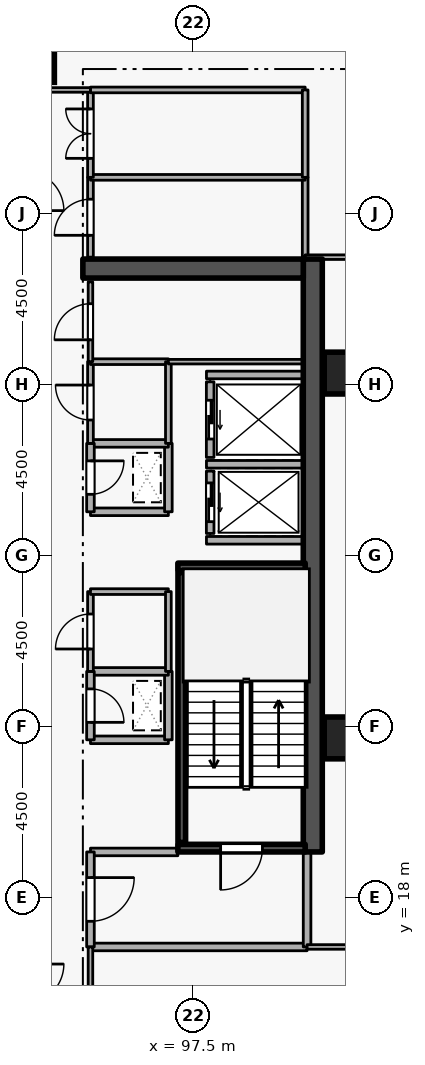
"""IFC4 building model, lengths in metres.
Left out: names, types, materials, properties, quantities, classifications, styles, units other than length and angle.
Written with IfcOpenShell. Run it as: python <this file> out.ifc"""

import sys

from ifc_helpers import new_model, si_unit, direction, frame, frame_2d, origin, origin_2d, place, context, subcontext, project, spatial, rectangle, extrude, element, fill, save


model = new_model("IFC4")
c1 = context("Model", 3, precision=1e-05, world=origin(), true_north=direction((0.0, 1.0)))
c2 = subcontext(c1, "Body", "Model", "MODEL_VIEW")
j1 = project(units=[si_unit("LENGTHUNIT", "METRE"), si_unit("PLANEANGLEUNIT", "RADIAN")], contexts=[c1])
p1 = place(None, origin())
s1 = spatial("IfcSite", under=j1, at=p1, CompositionType="ELEMENT")
p2 = place(p1, origin())
s2 = spatial("IfcBuilding", under=s1, at=p2, CompositionType="ELEMENT")
p3 = place(p2, frame((0.0, 0.0, 185.7)))
s3 = spatial("IfcBuildingStorey", under=s2, at=p3, CompositionType="ELEMENT", Elevation=185.7)
p4 = place(p3, frame((100.65, 19.2, 0.0), z_axis=(0.0, 0.0, 1.0), x_axis=(0.0, 1.0, 0.0)))
e1 = element("IfcWall", 1, at=p4, inside=s3, PredefinedType="SHEAR", context=c2, shape_type="SweptSolid", body=[
    extrude(rectangle(XDim=15.6, YDim=0.5, at=frame_2d((7.8, 0.0))), origin(), (0.0, 0.0, 1.0), 3.6),
])
p5 = place(p3, frame((94.6, 34.55, 0.0), z_axis=(0.0, 0.0, 1.0), x_axis=(1.0, 0.0, 0.0)))
e2 = element("IfcWall", 2, at=p5, inside=s3, PredefinedType="SHEAR", context=c2, shape_type="SweptSolid", body=[
    extrude(rectangle(XDim=5.8, YDim=0.5, at=frame_2d((2.9, 0.0))), origin(), (0.0, 0.0, 1.0), 3.6),
])
for number, where, z_axis, x_axis in (
    (3, (93.3, 40.0, 0.0), (0.0, 0.0, 1.0), (1.0, 0.0, 0.0)),
    (4, (101.5, 22.2, 0.0), (0.0, 0.0, 1.0), (1.0, 0.0, 0.0)),
    (5, (101.5, 31.8, 0.0), (0.0, 0.0, 1.0), (1.0, 0.0, 0.0)),
):
    element("IfcColumn", number, at=place(p3, frame(where, z_axis=z_axis, x_axis=x_axis)), inside=s3, PredefinedType="COLUMN", context=c2, shape_type="SweptSolid", body=[
        extrude(rectangle(XDim=1.1, YDim=1.1, at=origin_2d()), origin(), (0.0, 0.0, 1.0), 3.6),
    ])
p6 = place(p3, frame((97.95, 29.22, 0.0), z_axis=(0.0, 0.0, 1.0), x_axis=(0.0, -1.0, 0.0)))
e6 = element("IfcWall", 6, at=p6, inside=s3, PredefinedType="STANDARD", context=c2, shape_type="SweptSolid", body=[
    extrude(rectangle(XDim=1.64, YDim=0.2, at=frame_2d((0.82, 0.0))), origin(), (0.0, 0.0, 1.0), 3.34),
])
p7 = place(p6, frame((0.31, 0.0, 0.0)))
e7 = element("IfcOpeningElement", 7, at=p7, cuts=e6, PredefinedType="OPENING", context=c2, shape_type="SweptSolid", body=[
    extrude(rectangle(XDim=1.02, YDim=2.06, at=frame_2d((0.51, 1.03))), frame((0.0, 0.11, 0.0), z_axis=(0.0, -1.0, 0.0), x_axis=(1.0, 0.0, 0.0)), (0.0, 0.0, 1.0), 0.22),
])
p8 = place(p3, frame((97.95, 31.57, 0.0), z_axis=(0.0, 0.0, 1.0), x_axis=(0.0, -1.0, 0.0)))
e8 = element("IfcWall", 8, at=p8, inside=s3, PredefinedType="STANDARD", context=c2, shape_type="SweptSolid", body=[
    extrude(rectangle(XDim=1.99, YDim=0.2, at=frame_2d((0.995, 0.0))), origin(), (0.0, 0.0, 1.0), 3.34),
])
p9 = place(p8, frame((0.485, 0.0, 0.0)))
e9 = element("IfcOpeningElement", 9, at=p9, cuts=e8, PredefinedType="OPENING", context=c2, shape_type="SweptSolid", body=[
    extrude(rectangle(XDim=1.02, YDim=2.06, at=frame_2d((0.51, 1.03))), frame((0.0, 0.11, 0.0), z_axis=(0.0, -1.0, 0.0), x_axis=(1.0, 0.0, 0.0)), (0.0, 0.0, 1.0), 0.22),
])
for number, where, z_axis, x_axis in (
    (10, (97.852, 29.4, 0.0), (0.0, 0.0, 1.0), (1.0, 0.0, 0.0)),
    (11, (97.852, 27.4, 0.0), (0.0, 0.0, 1.0), (1.0, 0.0, 0.0)),
    (12, (97.852, 31.75, 0.0), (0.0, 0.0, 1.0), (1.0, 0.0, 0.0)),
):
    element("IfcWall", number, at=place(p3, frame(where, z_axis=z_axis, x_axis=x_axis)), inside=s3, PredefinedType="STANDARD", context=c2, shape_type="SweptSolid", body=[
        extrude(rectangle(XDim=2.536, YDim=0.2, at=frame_2d((1.268, 0.0))), origin(), (0.0, 0.0, 1.0), 3.34),
    ])
p10 = place(p3, frame((100.45, 19.3, 0.0), z_axis=(0.0, 0.0, 1.0), x_axis=(-1.0, 0.0, 0.0)))
e13 = element("IfcWall", 13, at=p10, inside=s3, PredefinedType="SHEAR", context=c2, shape_type="SweptSolid", body=[
    extrude(rectangle(XDim=3.35, YDim=0.2, at=frame_2d((1.675, 0.0))), origin(), (0.0, 0.0, 1.0), 3.6),
])
p11 = place(p10, frame((1.125, 0.0, 0.0)))
e14 = element("IfcOpeningElement", 14, at=p11, cuts=e13, PredefinedType="OPENING", context=c2, shape_type="SweptSolid", body=[
    extrude(rectangle(XDim=1.1, YDim=2.1, at=frame_2d((0.55, 1.05))), frame((0.0, 0.11, 0.0), z_axis=(0.0, -1.0, 0.0), x_axis=(1.0, 0.0, 0.0)), (0.0, 0.0, 1.0), 0.22),
])
p12 = place(p3, frame((97.1, 26.7, 0.0), z_axis=(0.0, 0.0, 1.0), x_axis=(1.0, 0.0, 0.0)))
e15 = element("IfcWall", 15, at=p12, inside=s3, PredefinedType="SHEAR", context=c2, shape_type="SweptSolid", body=[
    extrude(rectangle(XDim=3.35, YDim=0.2, at=frame_2d((1.675, 0.0))), origin(), (0.0, 0.0, 1.0), 3.6),
])
p13 = place(p3, frame((97.203, 26.55, 0.0), z_axis=(0.0, 0.0, 1.0), x_axis=(0.0, -1.0, 0.0)))
e16 = element("IfcWall", 16, at=p13, inside=s3, PredefinedType="SHEAR", context=c2, shape_type="SweptSolid", body=[
    extrude(rectangle(XDim=7.1, YDim=0.2, at=frame_2d((3.55, 0.0))), origin(), (0.0, 0.0, 1.0), 3.6),
])
p14 = place(p3, frame((94.8, 16.7, 0.0), z_axis=(0.0, 0.0, 1.0), x_axis=(1.0, 0.0, 0.0)))
e17 = element("IfcWall", 17, at=p14, inside=s3, PredefinedType="STANDARD", context=c2, shape_type="SweptSolid", body=[
    extrude(rectangle(XDim=5.7, YDim=0.2, at=frame_2d((2.85, 0.0))), origin(), (0.0, 0.0, 1.0), 3.34),
])
p15 = place(p3, frame((100.5, 16.7, 0.0), z_axis=(0.0, 0.0, 1.0), x_axis=(0.0, 1.0, 0.0)))
e18 = element("IfcWall", 18, at=p15, inside=s3, PredefinedType="STANDARD", context=c2, shape_type="SweptSolid", body=[
    extrude(rectangle(XDim=2.5, YDim=0.2, at=frame_2d((1.25, 0.0))), origin(), (0.0, 0.0, 1.0), 3.34),
])
p16 = place(p3, frame((97.1, 19.2, 0.0), z_axis=(0.0, 0.0, 1.0), x_axis=(-1.0, 0.0, 0.0)))
e19 = element("IfcWall", 19, at=p16, inside=s3, PredefinedType="STANDARD", context=c2, shape_type="SweptSolid", body=[
    extrude(rectangle(XDim=2.3, YDim=0.2, at=frame_2d((1.15, 0.0))), origin(), (0.0, 0.0, 1.0), 2.545),
])
p17 = place(p3, frame((94.8, 19.2, 0.0), z_axis=(0.0, 0.0, 1.0), x_axis=(0.0, -1.0, 0.0)))
e20 = element("IfcWall", 20, at=p17, inside=s3, PredefinedType="STANDARD", context=c2, shape_type="SweptSolid", body=[
    extrude(rectangle(XDim=2.5, YDim=0.2, at=frame_2d((1.25, 0.0))), origin(), (0.0, 0.0, 1.0), 3.34),
])
p18 = place(p17, frame((0.675, 0.0, 0.0)))
e21 = element("IfcOpeningElement", 21, at=p18, cuts=e20, PredefinedType="OPENING", context=c2, shape_type="SweptSolid", body=[
    extrude(rectangle(XDim=1.15, YDim=2.1, at=frame_2d((0.575, 1.05))), frame((0.0, 0.11, 0.0), z_axis=(0.0, -1.0, 0.0), x_axis=(1.0, 0.0, 0.0)), (0.0, 0.0, 1.0), 0.22),
])
p19 = place(p3, frame((94.8, 28.15, 0.0), z_axis=(0.0, 0.0, 1.0), x_axis=(1.0, 0.0, 0.0)))
e22 = element("IfcWall", 22, at=p19, inside=s3, PredefinedType="STANDARD", context=c2, shape_type="SweptSolid", body=[
    extrude(rectangle(XDim=2.05, YDim=0.2, at=frame_2d((1.025, 0.0))), origin(), (0.0, 0.0, 1.0), 3.34),
])
p20 = place(p3, frame((96.85, 28.15, 0.0), z_axis=(0.0, 0.0, 1.0), x_axis=(0.0, 1.0, 0.0)))
e23 = element("IfcWall", 23, at=p20, inside=s3, PredefinedType="STANDARD", context=c2, shape_type="SweptSolid", body=[
    extrude(rectangle(XDim=1.8, YDim=0.2, at=frame_2d((0.9, 0.0))), origin(), (0.0, 0.0, 1.0), 3.34),
])
p21 = place(p3, frame((96.85, 29.95, 0.0), z_axis=(0.0, 0.0, 1.0), x_axis=(-1.0, 0.0, 0.0)))
e24 = element("IfcWall", 24, at=p21, inside=s3, PredefinedType="STANDARD", context=c2, shape_type="SweptSolid", body=[
    extrude(rectangle(XDim=2.05, YDim=0.2, at=frame_2d((1.025, 0.0))), origin(), (0.0, 0.0, 1.0), 3.34),
])
p22 = place(p3, frame((94.8, 29.95, 0.0), z_axis=(0.0, 0.0, 1.0), x_axis=(0.0, -1.0, 0.0)))
e25 = element("IfcWall", 25, at=p22, inside=s3, PredefinedType="STANDARD", context=c2, shape_type="SweptSolid", body=[
    extrude(rectangle(XDim=1.8, YDim=0.2, at=frame_2d((0.9, 0.0))), origin(), (0.0, 0.0, 1.0), 3.34),
])
p23 = place(p22, frame((0.46, 0.0, 0.0)))
e26 = element("IfcOpeningElement", 26, at=p23, cuts=e25, PredefinedType="OPENING", context=c2, shape_type="SweptSolid", body=[
    extrude(rectangle(XDim=0.88, YDim=2.04, at=frame_2d((0.44, 1.02))), frame((0.0, 0.11, 0.0), z_axis=(0.0, -1.0, 0.0), x_axis=(1.0, 0.0, 0.0)), (0.0, 0.0, 1.0), 0.22),
])
p24 = place(p3, frame((94.8, 22.15, 0.0), z_axis=(0.0, 0.0, 1.0), x_axis=(1.0, 0.0, 0.0)))
e27 = element("IfcWall", 27, at=p24, inside=s3, PredefinedType="STANDARD", context=c2, shape_type="SweptSolid", body=[
    extrude(rectangle(XDim=2.05, YDim=0.2, at=frame_2d((1.025, 0.0))), origin(), (0.0, 0.0, 1.0), 3.34),
])
p25 = place(p3, frame((96.85, 22.15, 0.0), z_axis=(0.0, 0.0, 1.0), x_axis=(0.0, 1.0, 0.0)))
e28 = element("IfcWall", 28, at=p25, inside=s3, PredefinedType="STANDARD", context=c2, shape_type="SweptSolid", body=[
    extrude(rectangle(XDim=1.8, YDim=0.2, at=frame_2d((0.9, 0.0))), origin(), (0.0, 0.0, 1.0), 3.34),
])
p26 = place(p3, frame((96.85, 23.95, 0.0), z_axis=(0.0, 0.0, 1.0), x_axis=(-1.0, 0.0, 0.0)))
e29 = element("IfcWall", 29, at=p26, inside=s3, PredefinedType="STANDARD", context=c2, shape_type="SweptSolid", body=[
    extrude(rectangle(XDim=2.05, YDim=0.2, at=frame_2d((1.025, 0.0))), origin(), (0.0, 0.0, 1.0), 3.34),
])
p27 = place(p3, frame((94.8, 23.95, 0.0), z_axis=(0.0, 0.0, 1.0), x_axis=(0.0, -1.0, 0.0)))
e30 = element("IfcWall", 30, at=p27, inside=s3, PredefinedType="STANDARD", context=c2, shape_type="SweptSolid", body=[
    extrude(rectangle(XDim=1.8, YDim=0.2, at=frame_2d((0.9, 0.0))), origin(), (0.0, 0.0, 1.0), 3.34),
])
p28 = place(p27, frame((0.46, 0.0, 0.0)))
e31 = element("IfcOpeningElement", 31, at=p28, cuts=e30, PredefinedType="OPENING", context=c2, shape_type="SweptSolid", body=[
    extrude(rectangle(XDim=0.88, YDim=2.04, at=frame_2d((0.44, 1.02))), frame((0.0, 0.11, 0.0), z_axis=(0.0, -1.0, 0.0), x_axis=(1.0, 0.0, 0.0)), (0.0, 0.0, 1.0), 0.22),
])
p29 = place(p3, frame((94.8, 23.95, 0.0), z_axis=(0.0, 0.0, 1.0), x_axis=(0.0, 1.0, 0.0)))
e32 = element("IfcWall", 32, at=p29, inside=s3, PredefinedType="PARTITIONING", context=c2, shape_type="SweptSolid", body=[
    extrude(rectangle(XDim=2.1, YDim=0.15, at=frame_2d((1.05, 0.0))), origin(), (0.0, 0.0, 1.0), 3.34),
])
p30 = place(p29, frame((0.59, 0.0, 0.0)))
e33 = element("IfcOpeningElement", 33, at=p30, cuts=e32, PredefinedType="OPENING", context=c2, shape_type="SweptSolid", body=[
    extrude(rectangle(XDim=0.92, YDim=2.08, at=frame_2d((0.46, 1.04))), frame((0.0, 0.085, 0.0), z_axis=(0.0, -1.0, 0.0), x_axis=(1.0, 0.0, 0.0)), (0.0, 0.0, 1.0), 0.17),
])
p31 = place(p3, frame((94.8, 26.05, 0.0), z_axis=(0.0, 0.0, 1.0), x_axis=(1.0, 0.0, 0.0)))
e34 = element("IfcWall", 34, at=p31, inside=s3, PredefinedType="PARTITIONING", context=c2, shape_type="SweptSolid", body=[
    extrude(rectangle(XDim=2.05, YDim=0.15, at=frame_2d((1.025, 0.0))), origin(), (0.0, 0.0, 1.0), 3.34),
])
p32 = place(p3, frame((96.85, 26.05, 0.0), z_axis=(0.0, 0.0, 1.0), x_axis=(0.0, -1.0, 0.0)))
e35 = element("IfcWall", 35, at=p32, inside=s3, PredefinedType="PARTITIONING", context=c2, shape_type="SweptSolid", body=[
    extrude(rectangle(XDim=2.1, YDim=0.15, at=frame_2d((1.05, 0.0))), origin(), (0.0, 0.0, 1.0), 3.34),
])
p33 = place(p3, frame((94.8, 29.95, 0.0), z_axis=(0.0, 0.0, 1.0), x_axis=(0.0, 1.0, 0.0)))
e36 = element("IfcWall", 36, at=p33, inside=s3, PredefinedType="PARTITIONING", context=c2, shape_type="SweptSolid", body=[
    extrude(rectangle(XDim=2.15, YDim=0.15, at=frame_2d((1.075, 0.0))), origin(), (0.0, 0.0, 1.0), 3.34),
])
p34 = place(p33, frame((0.615, 0.0, 0.0)))
e37 = element("IfcOpeningElement", 37, at=p34, cuts=e36, PredefinedType="OPENING", context=c2, shape_type="SweptSolid", body=[
    extrude(rectangle(XDim=0.92, YDim=2.08, at=frame_2d((0.46, 1.04))), frame((0.0, 0.085, 0.0), z_axis=(0.0, -1.0, 0.0), x_axis=(1.0, 0.0, 0.0)), (0.0, 0.0, 1.0), 0.17),
])
p35 = place(p3, frame((94.8, 32.1, 0.0), z_axis=(0.0, 0.0, 1.0), x_axis=(1.0, 0.0, 0.0)))
e38 = element("IfcWall", 38, at=p35, inside=s3, PredefinedType="PARTITIONING", context=c2, shape_type="SweptSolid", body=[
    extrude(rectangle(XDim=2.05, YDim=0.15, at=frame_2d((1.025, 0.0))), origin(), (0.0, 0.0, 1.0), 3.34),
])
p36 = place(p3, frame((96.85, 32.1, 0.0), z_axis=(0.0, 0.0, 1.0), x_axis=(0.0, -1.0, 0.0)))
e39 = element("IfcWall", 39, at=p36, inside=s3, PredefinedType="PARTITIONING", context=c2, shape_type="SweptSolid", body=[
    extrude(rectangle(XDim=2.15, YDim=0.15, at=frame_2d((1.075, 0.0))), origin(), (0.0, 0.0, 1.0), 3.34),
])
p37 = place(p3, frame((94.8, 32.1, 0.0), z_axis=(0.0, 0.0, 1.0), x_axis=(0.0, 1.0, 0.0)))
e40 = element("IfcWall", 40, at=p37, inside=s3, PredefinedType="PARTITIONING", context=c2, shape_type="SweptSolid", body=[
    extrude(rectangle(XDim=2.1, YDim=0.12, at=frame_2d((1.05, 0.0))), origin(), (0.0, 0.0, 1.0), 3.34),
])
p38 = place(p37, frame((0.575, 0.0, 0.0)))
e41 = element("IfcOpeningElement", 41, at=p38, cuts=e40, PredefinedType="OPENING", context=c2, shape_type="SweptSolid", body=[
    extrude(rectangle(XDim=0.95, YDim=2.1, at=frame_2d((0.475, 1.05))), frame((0.0, 0.07, 0.0), z_axis=(0.0, -1.0, 0.0), x_axis=(1.0, 0.0, 0.0)), (0.0, 0.0, 1.0), 0.14),
])
p39 = place(p3, frame((100.4, 32.1, 0.0), z_axis=(0.0, 0.0, 1.0), x_axis=(-1.0, 0.0, 0.0)))
e42 = element("IfcWall", 42, at=p39, inside=s3, PredefinedType="PARTITIONING", context=c2, shape_type="SweptSolid", body=[
    extrude(rectangle(XDim=3.55, YDim=0.12, at=frame_2d((1.775, 0.0))), origin(), (0.0, 0.0, 1.0), 3.34),
])
p40 = place(p3, frame((100.45, 36.95, 0.0), z_axis=(0.0, 0.0, 1.0), x_axis=(0.0, -1.0, 0.0)))
e43 = element("IfcWall", 43, at=p40, inside=s3, PredefinedType="PARTITIONING", context=c2, shape_type="SweptSolid", body=[
    extrude(rectangle(XDim=2.1, YDim=0.15, at=frame_2d((1.05, 0.0))), origin(), (0.0, 0.0, 1.0), 3.34),
])
p41 = place(p3, frame((94.8, 34.85, 0.0), z_axis=(0.0, 0.0, 1.0), x_axis=(0.0, 1.0, 0.0)))
e44 = element("IfcWall", 44, at=p41, inside=s3, PredefinedType="PARTITIONING", context=c2, shape_type="SweptSolid", body=[
    extrude(rectangle(XDim=2.1, YDim=0.15, at=frame_2d((1.05, 0.0))), origin(), (0.0, 0.0, 1.0), 3.34),
])
p42 = place(p41, frame((0.575, 0.0, 0.0)))
e45 = element("IfcOpeningElement", 45, at=p42, cuts=e44, PredefinedType="OPENING", context=c2, shape_type="SweptSolid", body=[
    extrude(rectangle(XDim=0.95, YDim=2.1, at=frame_2d((0.475, 1.05))), frame((0.0, 0.085, 0.0), z_axis=(0.0, -1.0, 0.0), x_axis=(1.0, 0.0, 0.0)), (0.0, 0.0, 1.0), 0.17),
])
p43 = place(p3, frame((94.8, 36.95, 0.0), z_axis=(0.0, 0.0, 1.0), x_axis=(1.0, 0.0, 0.0)))
e46 = element("IfcWall", 46, at=p43, inside=s3, PredefinedType="PARTITIONING", context=c2, shape_type="SweptSolid", body=[
    extrude(rectangle(XDim=5.65, YDim=0.15, at=frame_2d((2.825, 0.0))), origin(), (0.0, 0.0, 1.0), 3.34),
])
p44 = place(p3, frame((94.8, 36.95, 0.0), z_axis=(0.0, 0.0, 1.0), x_axis=(0.0, 1.0, 0.0)))
e47 = element("IfcWall", 47, at=p44, inside=s3, PredefinedType="PARTITIONING", context=c2, shape_type="SweptSolid", body=[
    extrude(rectangle(XDim=2.3, YDim=0.15, at=frame_2d((1.15, 0.0))), origin(), (0.0, 0.0, 1.0), 3.34),
])
p45 = place(p44, frame((0.5, 0.0, 0.0)))
e48 = element("IfcOpeningElement", 48, at=p45, cuts=e47, PredefinedType="OPENING", context=c2, shape_type="SweptSolid", body=[
    extrude(rectangle(XDim=1.3, YDim=2.12, at=frame_2d((0.65, 1.06))), frame((0.0, 0.085, 0.0), z_axis=(0.0, -1.0, 0.0), x_axis=(1.0, 0.0, 0.0)), (0.0, 0.0, 1.0), 0.17),
])
p46 = place(p3, frame((94.8, 39.25, 0.0), z_axis=(0.0, 0.0, 1.0), x_axis=(1.0, 0.0, 0.0)))
e49 = element("IfcWall", 49, at=p46, inside=s3, PredefinedType="PARTITIONING", context=c2, shape_type="SweptSolid", body=[
    extrude(rectangle(XDim=5.65, YDim=0.15, at=frame_2d((2.825, 0.0))), origin(), (0.0, 0.0, 1.0), 3.34),
])
p47 = place(p3, frame((100.45, 39.25, 0.0), z_axis=(0.0, 0.0, 1.0), x_axis=(0.0, -1.0, 0.0)))
e50 = element("IfcWall", 50, at=p47, inside=s3, PredefinedType="PARTITIONING", context=c2, shape_type="SweptSolid", body=[
    extrude(rectangle(XDim=2.3, YDim=0.15, at=frame_2d((1.15, 0.0))), origin(), (0.0, 0.0, 1.0), 3.34),
])
p48 = place(p3, frame((94.8, 14.75, 0.0), z_axis=(0.0, 0.0, 1.0), x_axis=(0.0, 1.0, 0.0)))
e51 = element("IfcWall", 51, at=p48, inside=s3, PredefinedType="PARTITIONING", context=c2, shape_type="SweptSolid", body=[
    extrude(rectangle(XDim=1.95, YDim=0.12, at=frame_2d((0.975, 0.0))), origin(), (0.0, 0.0, 1.0), 3.34),
])
p49 = place(p3, frame((100.5, 16.7, 0.0), z_axis=(0.0, 0.0, 1.0), x_axis=(1.0, 0.0, 0.0)))
e52 = element("IfcWall", 52, at=p49, inside=s3, PredefinedType="PARTITIONING", context=c2, shape_type="SweptSolid", body=[
    extrude(rectangle(XDim=5.72, YDim=0.12, at=frame_2d((2.86, 0.0))), origin(), (0.0, 0.0, 1.0), 3.34),
])
p50 = place(p3, frame((94.8, 39.25, 0.0), z_axis=(0.0, 0.0, 1.0), x_axis=(-1.0, 0.0, 0.0)))
e53 = element("IfcWall", 53, at=p50, inside=s3, PredefinedType="PARTITIONING", context=c2, shape_type="SweptSolid", body=[
    extrude(rectangle(XDim=1.75, YDim=0.12, at=frame_2d((0.875, 0.0))), origin(), (0.0, 0.0, 1.0), 3.34),
])
p51 = place(p3, frame((106.22, 34.85, 0.0), z_axis=(0.0, 0.0, 1.0), x_axis=(-1.0, 0.0, 0.0)))
e54 = element("IfcWall", 54, at=p51, inside=s3, PredefinedType="PARTITIONING", context=c2, shape_type="SweptSolid", body=[
    extrude(rectangle(XDim=5.77, YDim=0.12, at=frame_2d((2.885, 0.0))), origin(), (0.0, 0.0, 1.0), 2.545),
])
p52 = place(p7, origin())
e55 = element("IfcDoor", 55, at=p52, inside=s3, OperationType="SLIDING_TO_LEFT", PredefinedType="DOOR", context=c2, shape_type="SweptSolid", body=[
    extrude(rectangle(XDim=1.02, YDim=2.06, at=frame_2d((0.51, 1.03))), frame((0.0, 0.025, 0.0), z_axis=(0.0, -1.0, 0.0), x_axis=(1.0, 0.0, 0.0)), (0.0, 0.0, 1.0), 0.05),
])
fill(e7, e55)
p53 = place(p9, origin())
e56 = element("IfcDoor", 56, at=p53, inside=s3, OperationType="SLIDING_TO_LEFT", PredefinedType="DOOR", context=c2, shape_type="SweptSolid", body=[
    extrude(rectangle(XDim=1.02, YDim=2.06, at=frame_2d((0.51, 1.03))), frame((0.0, 0.025, 0.0), z_axis=(0.0, -1.0, 0.0), x_axis=(1.0, 0.0, 0.0)), (0.0, 0.0, 1.0), 0.05),
])
fill(e9, e56)
p54 = place(p11, origin())
e57 = element("IfcDoor", 57, at=p54, inside=s3, OperationType="SINGLE_SWING_RIGHT", PredefinedType="DOOR", context=c2, shape_type="SweptSolid", body=[
    extrude(rectangle(XDim=1.1, YDim=2.1, at=frame_2d((0.55, 1.05))), frame((0.0, 0.025, 0.0), z_axis=(0.0, -1.0, 0.0), x_axis=(1.0, 0.0, 0.0)), (0.0, 0.0, 1.0), 0.05),
])
fill(e14, e57)
p55 = place(p18, origin())
e58 = element("IfcDoor", 58, at=p55, inside=s3, OperationType="SINGLE_SWING_LEFT", PredefinedType="DOOR", context=c2, shape_type="SweptSolid", body=[
    extrude(rectangle(XDim=1.15, YDim=2.1, at=frame_2d((0.575, 1.05))), frame((0.0, 0.025, 0.0), z_axis=(0.0, -1.0, 0.0), x_axis=(1.0, 0.0, 0.0)), (0.0, 0.0, 1.0), 0.05),
])
fill(e21, e58)
p56 = place(p23, origin())
e59 = element("IfcDoor", 59, at=p56, inside=s3, OperationType="SINGLE_SWING_LEFT", PredefinedType="DOOR", context=c2, shape_type="SweptSolid", body=[
    extrude(rectangle(XDim=0.88, YDim=2.04, at=frame_2d((0.44, 1.02))), frame((0.0, 0.025, 0.0), z_axis=(0.0, -1.0, 0.0), x_axis=(1.0, 0.0, 0.0)), (0.0, 0.0, 1.0), 0.05),
])
fill(e26, e59)
p57 = place(p28, origin())
e60 = element("IfcDoor", 60, at=p57, inside=s3, OperationType="SINGLE_SWING_RIGHT", PredefinedType="DOOR", context=c2, shape_type="SweptSolid", body=[
    extrude(rectangle(XDim=0.88, YDim=2.04, at=frame_2d((0.44, 1.02))), frame((0.0, 0.025, 0.0), z_axis=(0.0, -1.0, 0.0), x_axis=(1.0, 0.0, 0.0)), (0.0, 0.0, 1.0), 0.05),
])
fill(e31, e60)
p58 = place(p30, origin())
e61 = element("IfcDoor", 61, at=p58, inside=s3, OperationType="SINGLE_SWING_LEFT", PredefinedType="DOOR", context=c2, shape_type="SweptSolid", body=[
    extrude(rectangle(XDim=0.92, YDim=2.08, at=frame_2d((0.46, 1.04))), frame((0.0, 0.025, 0.0), z_axis=(0.0, -1.0, 0.0), x_axis=(1.0, 0.0, 0.0)), (0.0, 0.0, 1.0), 0.05),
])
fill(e33, e61)
p59 = place(p34, origin())
e62 = element("IfcDoor", 62, at=p59, inside=s3, OperationType="SINGLE_SWING_RIGHT", PredefinedType="DOOR", context=c2, shape_type="SweptSolid", body=[
    extrude(rectangle(XDim=0.92, YDim=2.08, at=frame_2d((0.46, 1.04))), frame((0.0, 0.025, 0.0), z_axis=(0.0, -1.0, 0.0), x_axis=(1.0, 0.0, 0.0)), (0.0, 0.0, 1.0), 0.05),
])
fill(e37, e62)
p60 = place(p38, origin())
e63 = element("IfcDoor", 63, at=p60, inside=s3, OperationType="SINGLE_SWING_LEFT", PredefinedType="DOOR", context=c2, shape_type="SweptSolid", body=[
    extrude(rectangle(XDim=0.95, YDim=2.1, at=frame_2d((0.475, 1.05))), frame((0.0, 0.025, 0.0), z_axis=(0.0, -1.0, 0.0), x_axis=(1.0, 0.0, 0.0)), (0.0, 0.0, 1.0), 0.05),
])
fill(e41, e63)
p61 = place(p42, origin())
e64 = element("IfcDoor", 64, at=p61, inside=s3, OperationType="SINGLE_SWING_LEFT", PredefinedType="DOOR", context=c2, shape_type="SweptSolid", body=[
    extrude(rectangle(XDim=0.95, YDim=2.1, at=frame_2d((0.475, 1.05))), frame((0.0, 0.025, 0.0), z_axis=(0.0, -1.0, 0.0), x_axis=(1.0, 0.0, 0.0)), (0.0, 0.0, 1.0), 0.05),
])
fill(e45, e64)
p62 = place(p45, origin())
e65 = element("IfcDoor", 65, at=p62, inside=s3, OperationType="DOUBLE_DOOR_SINGLE_SWING", PredefinedType="DOOR", context=c2, shape_type="SweptSolid", body=[
    extrude(rectangle(XDim=1.3, YDim=2.12, at=frame_2d((0.65, 1.06))), frame((0.0, 0.025, 0.0), z_axis=(0.0, -1.0, 0.0), x_axis=(1.0, 0.0, 0.0)), (0.0, 0.0, 1.0), 0.05),
])
fill(e48, e65)
save(model, sys.argv[1])
